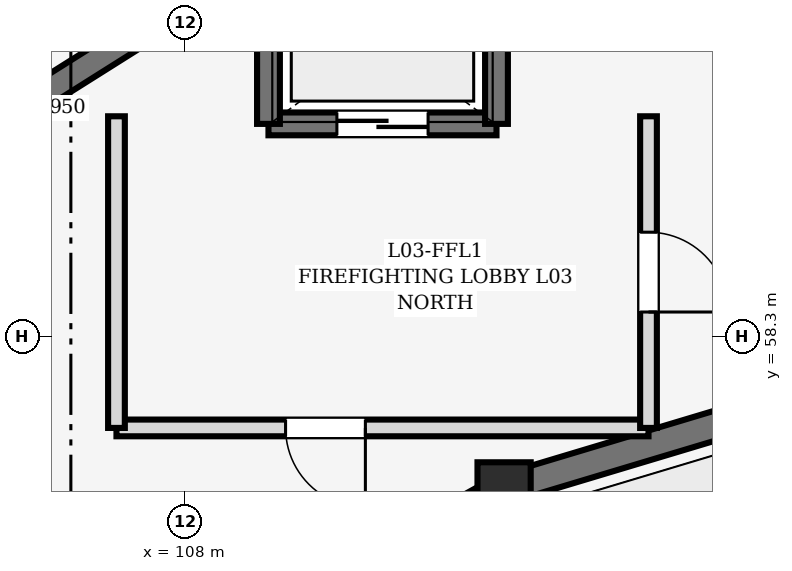
"""IFC4 building model, lengths in metres.
Left out: names, types, materials, properties, quantities, classifications, styles, units other than length and angle.
Written with IfcOpenShell. Run it as: python <this file> out.ifc"""

import sys

from ifc_helpers import new_model, si_unit, direction, frame, frame_2d, origin, origin_2d, place, context, subcontext, project, spatial, rectangle, extrude, element, fill, save


model = new_model("IFC4")
c1 = context("Model", 3, precision=1e-05, world=origin(), true_north=direction((0.0, 1.0)))
c2 = subcontext(c1, "Body", "Model", "MODEL_VIEW")
j1 = project(units=[si_unit("LENGTHUNIT", "METRE"), si_unit("PLANEANGLEUNIT", "RADIAN")], contexts=[c1])
p1 = place(None, origin())
s1 = spatial("IfcSite", under=j1, at=p1, CompositionType="ELEMENT")
p2 = place(p1, origin())
s2 = spatial("IfcBuilding", under=s1, at=p2, CompositionType="ELEMENT")
p3 = place(p2, frame((0.0, 0.0, 10.2)))
s3 = spatial("IfcBuildingStorey", under=s2, at=p3, CompositionType="ELEMENT", Elevation=10.2)
p4 = place(p3, frame((112.2, 56.298, 0.0), z_axis=(0.0, 0.0, 1.0), x_axis=(1.0, 0.0, 0.0)))
e1 = element("IfcColumn", 1, at=p4, inside=s3, PredefinedType="COLUMN", context=c2, shape_type="SweptSolid", body=[
    extrude(rectangle(XDim=0.7, YDim=0.7, at=origin_2d()), origin(), (0.0, 0.0, 1.0), 4.5),
])
p5 = place(p3, frame((116.654, 57.634, 0.0), z_axis=(0.0, 0.0, 1.0), x_axis=(-0.957792414988, -0.287460762177, 0.0)))
e2 = element("IfcWall", 2, at=p5, inside=s3, PredefinedType="SOLIDWALL", context=c2, shape_type="SweptSolid", body=[
    extrude(rectangle(XDim=4.365, YDim=0.38, at=frame_2d((2.183, 0.0))), origin(), (0.0, 0.0, 1.0), 4.24),
])
p6 = place(p3, frame((111.951, 56.159, 0.0), z_axis=(0.0, 0.0, 1.0), x_axis=(-0.87401308715, -0.485902380618, 0.0)))
e3 = element("IfcWall", 3, at=p6, inside=s3, PredefinedType="SOLIDWALL", context=c2, shape_type="SweptSolid", body=[
    extrude(rectangle(XDim=4.074, YDim=0.38, at=frame_2d((2.037, 0.0))), origin(), (0.0, 0.0, 1.0), 4.24),
])
p7 = place(p3, frame((108.346, 62.893, 0.0), z_axis=(0.0, 0.0, 1.0), x_axis=(-0.846132783073, -0.532972150688, 0.0)))
e4 = element("IfcWall", 4, at=p7, inside=s3, PredefinedType="SHEAR", context=c2, shape_type="SweptSolid", body=[
    extrude(rectangle(XDim=5.95, YDim=0.35, at=frame_2d((2.975, 0.0))), origin(), (0.0, 0.0, 1.0), 4.24),
])
p8 = place(p3, frame((112.1, 61.1, 0.0), z_axis=(0.0, 0.0, 1.0), x_axis=(-1.0, 0.0, 0.0)))
e5 = element("IfcWall", 5, at=p8, inside=s3, PredefinedType="SHEAR", context=c2, shape_type="SweptSolid", body=[
    extrude(rectangle(XDim=3.0, YDim=0.3, at=frame_2d((1.5, 0.0))), origin(), (0.0, 0.0, 1.0), 4.25),
])
p9 = place(p8, frame((0.9, 0.0, 0.0)))
e6 = element("IfcOpeningElement", 6, at=p9, cuts=e5, PredefinedType="OPENING", context=c2, shape_type="SweptSolid", body=[
    extrude(rectangle(XDim=1.2, YDim=2.15, at=frame_2d((0.6, 1.075))), frame((0.0, 0.162, 0.0), z_axis=(0.0, -1.0, 0.0), x_axis=(1.0, 0.0, 0.0)), (0.0, 0.0, 1.0), 0.324),
])
p10 = place(p3, frame((112.1, 63.3, 0.0), z_axis=(0.0, 0.0, 1.0), x_axis=(0.0, -1.0, 0.0)))
e7 = element("IfcWall", 7, at=p10, inside=s3, PredefinedType="SHEAR", context=c2, shape_type="SweptSolid", body=[
    extrude(rectangle(XDim=2.2, YDim=0.3, at=frame_2d((1.1, 0.0))), origin(), (0.0, 0.0, 1.0), 4.25),
])
p11 = place(p3, frame((109.1, 61.1, 0.0), z_axis=(0.0, 0.0, 1.0), x_axis=(0.0, 1.0, 0.0)))
e8 = element("IfcWall", 8, at=p11, inside=s3, PredefinedType="SHEAR", context=c2, shape_type="SweptSolid", body=[
    extrude(rectangle(XDim=2.2, YDim=0.3, at=frame_2d((1.1, 0.0))), origin(), (0.0, 0.0, 1.0), 4.24),
])
p12 = place(p3, frame((114.1, 57.1, 0.0), z_axis=(0.0, 0.0, 1.0), x_axis=(-1.0, 0.0, 0.0)))
e9 = element("IfcWall", 9, at=p12, inside=s3, PredefinedType="SOLIDWALL", context=c2, shape_type="SweptSolid", body=[
    extrude(rectangle(XDim=7.0, YDim=0.22, at=frame_2d((3.5, 0.0))), origin(), (0.0, 0.0, 1.0), 4.235),
])
p13 = place(p12, frame((3.725, 0.0, 0.0)))
e10 = element("IfcOpeningElement", 10, at=p13, cuts=e9, PredefinedType="OPENING", context=c2, shape_type="SweptSolid", body=[
    extrude(rectangle(XDim=1.05, YDim=2.15, at=frame_2d((0.525, 1.075))), frame((0.0, 0.122, 0.0), z_axis=(0.0, -1.0, 0.0), x_axis=(1.0, 0.0, 0.0)), (0.0, 0.0, 1.0), 0.244),
])
p14 = place(p3, frame((107.1, 57.1, 0.0), z_axis=(0.0, 0.0, 1.0), x_axis=(0.0, 1.0, 0.0)))
e11 = element("IfcWall", 11, at=p14, inside=s3, PredefinedType="SOLIDWALL", context=c2, shape_type="SweptSolid", body=[
    extrude(rectangle(XDim=4.1, YDim=0.22, at=frame_2d((2.05, 0.0))), origin(), (0.0, 0.0, 1.0), 4.235),
])
p15 = place(p3, frame((114.1, 61.2, 0.0), z_axis=(0.0, 0.0, 1.0), x_axis=(0.0, -1.0, 0.0)))
e12 = element("IfcWall", 12, at=p15, inside=s3, PredefinedType="SOLIDWALL", context=c2, shape_type="SweptSolid", body=[
    extrude(rectangle(XDim=4.1, YDim=0.22, at=frame_2d((2.05, 0.0))), origin(), (0.0, 0.0, 1.0), 4.235),
])
p16 = place(p15, frame((1.525, 0.0, 0.0)))
e13 = element("IfcOpeningElement", 13, at=p16, cuts=e12, PredefinedType="OPENING", context=c2, shape_type="SweptSolid", body=[
    extrude(rectangle(XDim=1.05, YDim=2.15, at=frame_2d((0.525, 1.075))), frame((0.0, 0.122, 0.0), z_axis=(0.0, -1.0, 0.0), x_axis=(1.0, 0.0, 0.0)), (0.0, 0.0, 1.0), 0.244),
])
p17 = place(p9, origin())
e14 = element("IfcDoor", 14, at=p17, inside=s3, OperationType="DOUBLE_DOOR_SLIDING", PredefinedType="DOOR", context=c2, shape_type="SweptSolid", body=[
    extrude(rectangle(XDim=1.2, YDim=2.15, at=frame_2d((0.6, 1.075))), frame((0.0, 0.025, 0.0), z_axis=(0.0, -1.0, 0.0), x_axis=(1.0, 0.0, 0.0)), (0.0, 0.0, 1.0), 0.05),
])
fill(e6, e14)
p18 = place(p13, origin())
e15 = element("IfcDoor", 15, at=p18, inside=s3, OperationType="SINGLE_SWING_LEFT", PredefinedType="DOOR", context=c2, shape_type="SweptSolid", body=[
    extrude(rectangle(XDim=1.05, YDim=2.15, at=frame_2d((0.525, 1.075))), frame((0.0, 0.025, 0.0), z_axis=(0.0, -1.0, 0.0), x_axis=(1.0, 0.0, 0.0)), (0.0, 0.0, 1.0), 0.05),
])
fill(e10, e15)
p19 = place(p16, origin())
e16 = element("IfcDoor", 16, at=p19, inside=s3, OperationType="SINGLE_SWING_RIGHT", PredefinedType="DOOR", context=c2, shape_type="SweptSolid", body=[
    extrude(rectangle(XDim=1.05, YDim=2.15, at=frame_2d((0.525, 1.075))), frame((0.0, 0.025, 0.0), z_axis=(0.0, -1.0, 0.0), x_axis=(1.0, 0.0, 0.0)), (0.0, 0.0, 1.0), 0.05),
])
fill(e13, e16)
save(model, sys.argv[1])
